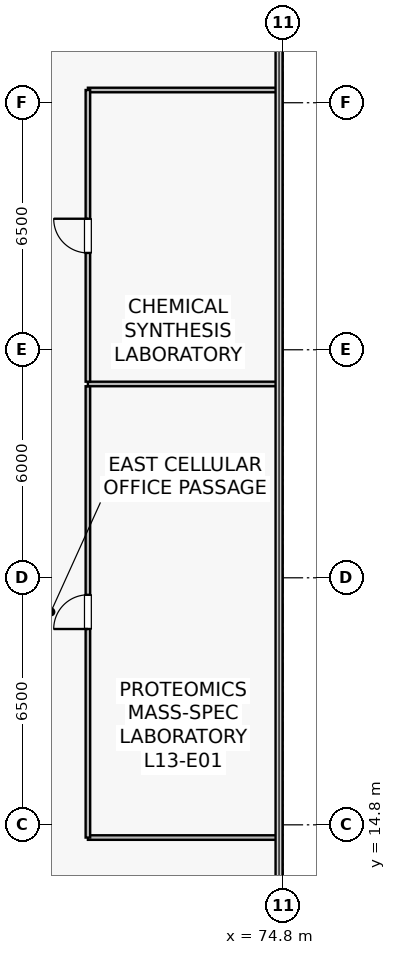
"""IFC4 building model, lengths in metres.
Left out: names, types, materials, properties, quantities, classifications, styles, units other than length and angle.
Written with IfcOpenShell. Run it as: python <this file> out.ifc"""

import sys

from ifc_helpers import new_model, si_unit, direction, frame, frame_2d, origin, place, context, subcontext, project, spatial, rectangle, extrude, source, transform, mapped, element, fill, save


model = new_model("IFC4")
c1 = context("Model", 3, precision=1e-05, world=origin(), true_north=direction((0.0, 1.0)))
c2 = subcontext(c1, "Body", "Model", "MODEL_VIEW")
j1 = project(units=[si_unit("LENGTHUNIT", "METRE"), si_unit("PLANEANGLEUNIT", "RADIAN")], contexts=[c1])
p1 = place(None, origin())
s1 = spatial("IfcSite", under=j1, at=p1, CompositionType="ELEMENT")
p2 = place(p1, origin())
s2 = spatial("IfcBuilding", under=s1, at=p2, CompositionType="ELEMENT")
p3 = place(p2, frame((0.0, 0.0, 53.9)))
s3 = spatial("IfcBuildingStorey", under=s2, at=p3, CompositionType="ELEMENT", Elevation=53.9)
for number, where, z_axis, x_axis in (
    (1, (69.67, 14.465, 0.0), (0.0, 0.0, 1.0), (1.0, 0.0, 0.0)),
    (2, (69.67, 34.135, 0.0), (0.0, 0.0, 1.0), (1.0, 0.0, 0.0)),
):
    element("IfcWall", number, at=place(p3, frame(where, z_axis=z_axis, x_axis=x_axis)), inside=s3, PredefinedType="PARTITIONING", context=c2, shape_type="SweptSolid", body=[
        extrude(rectangle(XDim=5.02, YDim=0.12, at=frame_2d((2.51, 0.0))), origin(), (0.0, 0.0, 1.0), 3.78),
    ])
p4 = place(p3, frame((69.67, 14.465, 0.0), z_axis=(0.0, 0.0, 1.0), x_axis=(0.0, 1.0, 0.0)))
e3 = element("IfcWall", 3, at=p4, inside=s3, PredefinedType="PARTITIONING", context=c2, shape_type="SweptSolid", body=[
    extrude(rectangle(XDim=11.875, YDim=0.12, at=frame_2d((5.938, 0.0))), origin(), (0.0, 0.0, 1.0), 3.78),
])
p5 = place(p4, frame((5.488, 0.0, 0.0)))
e4 = element("IfcOpeningElement", 4, at=p5, cuts=e3, PredefinedType="OPENING", context=c2, shape_type="SweptSolid", body=[
    extrude(rectangle(XDim=0.9, YDim=2.1, at=frame_2d((0.45, 1.05))), frame((0.0, 0.07, 0.0), z_axis=(0.0, -1.0, 0.0), x_axis=(1.0, 0.0, 0.0)), (0.0, 0.0, 1.0), 0.14),
])
p6 = place(p3, frame((69.67, 26.4, 0.0), z_axis=(0.0, 0.0, 1.0), x_axis=(1.0, 0.0, 0.0)))
e5 = element("IfcWall", 5, at=p6, inside=s3, PredefinedType="PARTITIONING", context=c2, shape_type="SweptSolid", body=[
    extrude(rectangle(XDim=5.02, YDim=0.12, at=frame_2d((2.51, 0.0))), origin(), (0.0, 0.0, 1.0), 3.78),
])
p7 = place(p3, frame((69.67, 26.46, 0.0), z_axis=(0.0, 0.0, 1.0), x_axis=(0.0, 1.0, 0.0)))
e6 = element("IfcWall", 6, at=p7, inside=s3, PredefinedType="PARTITIONING", context=c2, shape_type="SweptSolid", body=[
    extrude(rectangle(XDim=7.675, YDim=0.12, at=frame_2d((3.837, 0.0))), origin(), (0.0, 0.0, 1.0), 3.78),
])
p8 = place(p7, frame((3.387, 0.0, 0.0)))
e7 = element("IfcOpeningElement", 7, at=p8, cuts=e6, PredefinedType="OPENING", context=c2, shape_type="SweptSolid", body=[
    extrude(rectangle(XDim=0.9, YDim=2.1, at=frame_2d((0.45, 1.05))), frame((0.0, 0.07, 0.0), z_axis=(0.0, -1.0, 0.0), x_axis=(1.0, 0.0, 0.0)), (0.0, 0.0, 1.0), 0.14),
])
m1 = source(origin(), c2, "Body", "SweptSolid", [
    extrude(rectangle(XDim=0.9, YDim=2.1, at=frame_2d((0.45, 1.05))), frame((0.0, 0.025, 0.0), z_axis=(0.0, -1.0, 0.0), x_axis=(1.0, 0.0, 0.0)), (0.0, 0.0, 1.0), 0.05),
])
p9 = place(p5, origin())
e8 = element("IfcDoor", 8, at=p9, inside=s3, OperationType="SINGLE_SWING_LEFT", PredefinedType="DOOR", context=c2, shape_type="MappedRepresentation", body=[
    mapped(m1, transform((0.0, 0.0, 0.0), scale=1.0)),
])
fill(e4, e8)
p10 = place(p8, origin())
e9 = element("IfcDoor", 9, at=p10, inside=s3, OperationType="SINGLE_SWING_RIGHT", PredefinedType="DOOR", context=c2, shape_type="MappedRepresentation", body=[
    mapped(m1, transform((0.0, 0.0, 0.0), scale=1.0)),
])
fill(e7, e9)
save(model, sys.argv[1])
